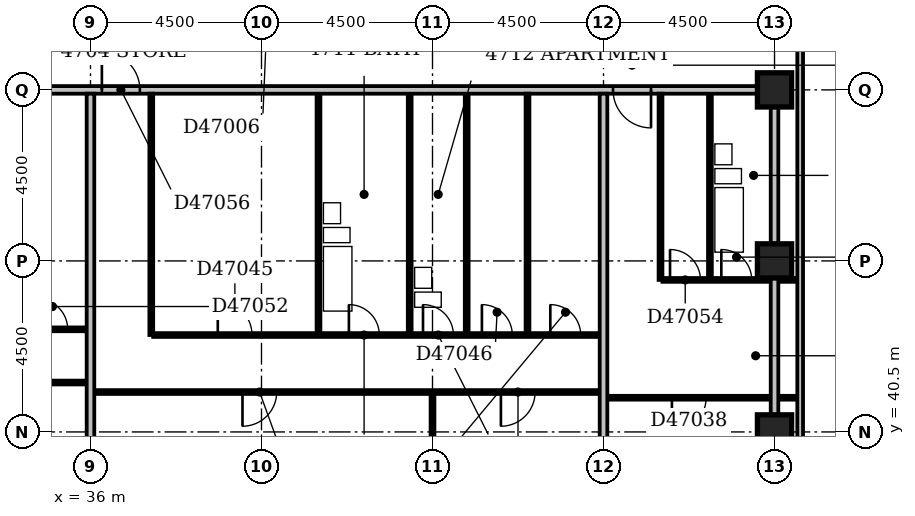
"""IFC4 building model, lengths in metres.
Left out: names, types, materials, properties, quantities, classifications, styles, units other than length and angle.
Written with IfcOpenShell. Run it as: python <this file> out.ifc"""

import sys

from ifc_helpers import new_model, si_unit, direction, frame, frame_2d, origin, origin_2d, place, context, subcontext, project, spatial, rectangle, extrude, element, fill, save


model = new_model("IFC4")
c1 = context("Model", 3, precision=1e-05, world=origin(), true_north=direction((0.0, 1.0)))
c2 = subcontext(c1, "Body", "Model", "MODEL_VIEW")
j1 = project(units=[si_unit("LENGTHUNIT", "METRE"), si_unit("PLANEANGLEUNIT", "RADIAN")], contexts=[c1])
p1 = place(None, origin())
s1 = spatial("IfcSite", under=j1, at=p1, CompositionType="ELEMENT")
p2 = place(p1, origin())
s2 = spatial("IfcBuilding", under=s1, at=p2, CompositionType="ELEMENT")
p3 = place(p2, frame((0.0, 0.0, 186.2)))
s3 = spatial("IfcBuildingStorey", under=s2, at=p3, CompositionType="ELEMENT", Elevation=186.2)
for number, where, z_axis, x_axis in (
    (1, (54.0, 40.5, -0.35), (0.0, 0.0, 1.0), (1.0, 0.0, 0.0)),
    (2, (54.0, 45.0, -0.35), (0.0, 0.0, 1.0), (1.0, 0.0, 0.0)),
    (3, (54.0, 49.5, -0.35), (0.0, 0.0, 1.0), (1.0, 0.0, 0.0)),
):
    element("IfcColumn", number, at=place(p3, frame(where, z_axis=z_axis, x_axis=x_axis)), inside=s3, PredefinedType="COLUMN", context=c2, shape_type="SweptSolid", body=[
        extrude(rectangle(XDim=0.9, YDim=0.9, at=origin_2d()), origin(), (0.0, 0.0, 1.0), 3.65),
    ])
p4 = place(p3, frame((54.675, 39.9, 0.0), z_axis=(0.0, 0.0, 1.0), x_axis=(0.0, 1.0, 0.0)))
e4 = element("IfcWall", 4, at=p4, inside=s3, PredefinedType="STANDARD", context=c2, shape_type="SweptSolid", body=[
    extrude(rectangle(XDim=14.85, YDim=0.15, at=frame_2d((7.425, 0.0))), origin(), (0.0, 0.0, 1.0), 2.7),
])
p5 = place(p4, frame((11.25, 0.0, 0.0)))
e5 = element("IfcOpeningElement", 5, at=p5, cuts=e4, PredefinedType="OPENING", context=c2, shape_type="SweptSolid", body=[
    extrude(rectangle(XDim=1.2, YDim=2.4, at=frame_2d((0.6, 1.2))), frame((0.0, 0.087, 0.0), z_axis=(0.0, -1.0, 0.0), x_axis=(1.0, 0.0, 0.0)), (0.0, 0.0, 1.0), 0.174),
])
p6 = place(p3, frame((36.0, 36.45, 0.0), z_axis=(0.0, 0.0, 1.0), x_axis=(0.0, 1.0, 0.0)))
e6 = element("IfcWall", 6, at=p6, inside=s3, PredefinedType="PARTITIONING", context=c2, shape_type="SweptSolid", body=[
    extrude(rectangle(XDim=12.95, YDim=0.2, at=frame_2d((6.475, 0.0))), origin(), (0.0, 0.0, 1.0), 2.4),
])
p7 = place(p3, frame((45.0, 36.45, 0.0), z_axis=(0.0, 0.0, 1.0), x_axis=(0.0, 1.0, 0.0)))
e7 = element("IfcWall", 7, at=p7, inside=s3, PredefinedType="PARTITIONING", context=c2, shape_type="SweptSolid", body=[
    extrude(rectangle(XDim=5.05, YDim=0.1, at=frame_2d((2.525, 0.0))), origin(), (0.0, 0.0, 1.0), 2.6),
])
p8 = place(p3, frame((49.5, 36.45, 0.0), z_axis=(0.0, 0.0, 1.0), x_axis=(0.0, 1.0, 0.0)))
e8 = element("IfcWall", 8, at=p8, inside=s3, PredefinedType="PARTITIONING", context=c2, shape_type="SweptSolid", body=[
    extrude(rectangle(XDim=12.95, YDim=0.2, at=frame_2d((6.475, 0.0))), origin(), (0.0, 0.0, 1.0), 3.3),
])
p9 = place(p3, frame((54.0, 40.95, 0.0), z_axis=(0.0, 0.0, 1.0), x_axis=(0.0, 1.0, 0.0)))
e9 = element("IfcWall", 9, at=p9, inside=s3, PredefinedType="PARTITIONING", context=c2, shape_type="SweptSolid", body=[
    extrude(rectangle(XDim=8.1, YDim=0.2, at=frame_2d((4.05, 0.0))), origin(), (0.0, 0.0, 1.0), 2.7),
])
p10 = place(p3, frame((49.6, 41.4, 0.0), z_axis=(0.0, 0.0, 1.0), x_axis=(1.0, 0.0, 0.0)))
e10 = element("IfcWall", 10, at=p10, inside=s3, PredefinedType="PARTITIONING", context=c2, shape_type="SweptSolid", body=[
    extrude(rectangle(XDim=5.0, YDim=0.1, at=frame_2d((2.5, 0.0))), origin(), (0.0, 0.0, 1.0), 3.3),
])
p11 = place(p10, frame((1.7, 0.0, 0.0)))
e11 = element("IfcOpeningElement", 11, at=p11, cuts=e10, PredefinedType="OPENING", context=c2, shape_type="SweptSolid", body=[
    extrude(rectangle(XDim=0.9, YDim=2.1, at=frame_2d((0.45, 1.05))), frame((0.0, 0.062, 0.0), z_axis=(0.0, -1.0, 0.0), x_axis=(1.0, 0.0, 0.0)), (0.0, 0.0, 1.0), 0.124),
])
p12 = place(p3, frame((36.1, 41.55, 0.0), z_axis=(0.0, 0.0, 1.0), x_axis=(1.0, 0.0, 0.0)))
e12 = element("IfcWall", 12, at=p12, inside=s3, PredefinedType="PARTITIONING", context=c2, shape_type="SweptSolid", body=[
    extrude(rectangle(XDim=13.3, YDim=0.1, at=frame_2d((6.65, 0.0))), origin(), (0.0, 0.0, 1.0), 3.3),
])
p13 = place(p12, frame((3.9, 0.0, 0.0)))
e13 = element("IfcOpeningElement", 13, at=p13, cuts=e12, PredefinedType="OPENING", context=c2, shape_type="SweptSolid", body=[
    extrude(rectangle(XDim=0.9, YDim=2.1, at=frame_2d((0.45, 1.05))), frame((0.0, 0.062, 0.0), z_axis=(0.0, -1.0, 0.0), x_axis=(1.0, 0.0, 0.0)), (0.0, 0.0, 1.0), 0.124),
])
p14 = place(p12, frame((10.7, 0.0, 0.0)))
e14 = element("IfcOpeningElement", 14, at=p14, cuts=e12, PredefinedType="OPENING", context=c2, shape_type="SweptSolid", body=[
    extrude(rectangle(XDim=0.9, YDim=2.1, at=frame_2d((0.45, 1.05))), frame((0.0, 0.062, 0.0), z_axis=(0.0, -1.0, 0.0), x_axis=(1.0, 0.0, 0.0)), (0.0, 0.0, 1.0), 0.124),
])
p15 = place(p3, frame((22.6, 41.8, 0.0), z_axis=(0.0, 0.0, 1.0), x_axis=(1.0, 0.0, 0.0)))
e15 = element("IfcWall", 15, at=p15, inside=s3, PredefinedType="PARTITIONING", context=c2, shape_type="SweptSolid", body=[
    extrude(rectangle(XDim=13.3, YDim=0.1, at=frame_2d((6.65, 0.0))), origin(), (0.0, 0.0, 1.0), 3.3),
])
p16 = place(p15, frame((1.7, 0.0, 0.0)))
e16 = element("IfcOpeningElement", 16, at=p16, cuts=e15, PredefinedType="OPENING", context=c2, shape_type="SweptSolid", body=[
    extrude(rectangle(XDim=0.9, YDim=2.1, at=frame_2d((0.45, 1.05))), frame((0.0, 0.062, 0.0), z_axis=(0.0, -1.0, 0.0), x_axis=(1.0, 0.0, 0.0)), (0.0, 0.0, 1.0), 0.124),
])
p17 = place(p15, frame((6.2, 0.0, 0.0)))
e17 = element("IfcOpeningElement", 17, at=p17, cuts=e15, PredefinedType="OPENING", context=c2, shape_type="SweptSolid", body=[
    extrude(rectangle(XDim=0.9, YDim=2.1, at=frame_2d((0.45, 1.05))), frame((0.0, 0.062, 0.0), z_axis=(0.0, -1.0, 0.0), x_axis=(1.0, 0.0, 0.0)), (0.0, 0.0, 1.0), 0.124),
])
p18 = place(p15, frame((10.7, 0.0, 0.0)))
e18 = element("IfcOpeningElement", 18, at=p18, cuts=e15, PredefinedType="OPENING", context=c2, shape_type="SweptSolid", body=[
    extrude(rectangle(XDim=0.9, YDim=2.1, at=frame_2d((0.45, 1.05))), frame((0.0, 0.062, 0.0), z_axis=(0.0, -1.0, 0.0), x_axis=(1.0, 0.0, 0.0)), (0.0, 0.0, 1.0), 0.124),
])
p19 = place(p3, frame((37.6, 43.05, 0.0), z_axis=(0.0, 0.0, 1.0), x_axis=(0.0, 1.0, 0.0)))
e19 = element("IfcWall", 19, at=p19, inside=s3, PredefinedType="PARTITIONING", context=c2, shape_type="SweptSolid", body=[
    extrude(rectangle(XDim=6.35, YDim=0.1, at=frame_2d((3.175, 0.0))), origin(), (0.0, 0.0, 1.0), 3.3),
])
p20 = place(p3, frame((37.65, 43.05, 0.0), z_axis=(0.0, 0.0, 1.0), x_axis=(1.0, 0.0, 0.0)))
e20 = element("IfcWall", 20, at=p20, inside=s3, PredefinedType="PARTITIONING", context=c2, shape_type="SweptSolid", body=[
    extrude(rectangle(XDim=11.75, YDim=0.1, at=frame_2d((5.875, 0.0))), origin(), (0.0, 0.0, 1.0), 3.3),
])
p21 = place(p20, frame((5.15, 0.0, 0.0)))
e21 = element("IfcOpeningElement", 21, at=p21, cuts=e20, PredefinedType="OPENING", context=c2, shape_type="SweptSolid", body=[
    extrude(rectangle(XDim=0.8, YDim=2.1, at=frame_2d((0.4, 1.05))), frame((0.0, 0.062, 0.0), z_axis=(0.0, -1.0, 0.0), x_axis=(1.0, 0.0, 0.0)), (0.0, 0.0, 1.0), 0.124),
])
p22 = place(p20, frame((1.7, 0.0, 0.0)))
e22 = element("IfcOpeningElement", 22, at=p22, cuts=e20, PredefinedType="OPENING", context=c2, shape_type="SweptSolid", body=[
    extrude(rectangle(XDim=0.9, YDim=2.1, at=frame_2d((0.45, 1.05))), frame((0.0, 0.062, 0.0), z_axis=(0.0, -1.0, 0.0), x_axis=(1.0, 0.0, 0.0)), (0.0, 0.0, 1.0), 0.124),
])
p23 = place(p20, frame((8.65, 0.0, 0.0)))
e23 = element("IfcOpeningElement", 23, at=p23, cuts=e20, PredefinedType="OPENING", context=c2, shape_type="SweptSolid", body=[
    extrude(rectangle(XDim=0.8, YDim=2.1, at=frame_2d((0.4, 1.05))), frame((0.0, 0.062, 0.0), z_axis=(0.0, -1.0, 0.0), x_axis=(1.0, 0.0, 0.0)), (0.0, 0.0, 1.0), 0.124),
])
p24 = place(p20, frame((10.45, 0.0, 0.0)))
e24 = element("IfcOpeningElement", 24, at=p24, cuts=e20, PredefinedType="OPENING", context=c2, shape_type="SweptSolid", body=[
    extrude(rectangle(XDim=0.8, YDim=2.1, at=frame_2d((0.4, 1.05))), frame((0.0, 0.062, 0.0), z_axis=(0.0, -1.0, 0.0), x_axis=(1.0, 0.0, 0.0)), (0.0, 0.0, 1.0), 0.124),
])
p25 = place(p20, frame((7.1, 0.0, 0.0)))
e25 = element("IfcOpeningElement", 25, at=p25, cuts=e20, PredefinedType="OPENING", context=c2, shape_type="SweptSolid", body=[
    extrude(rectangle(XDim=0.8, YDim=2.1, at=frame_2d((0.4, 1.05))), frame((0.0, 0.062, 0.0), z_axis=(0.0, -1.0, 0.0), x_axis=(1.0, 0.0, 0.0)), (0.0, 0.0, 1.0), 0.124),
])
p26 = place(p3, frame((42.0, 43.1, 0.0), z_axis=(0.0, 0.0, 1.0), x_axis=(0.0, 1.0, 0.0)))
e26 = element("IfcWall", 26, at=p26, inside=s3, PredefinedType="PLUMBINGWALL", context=c2, shape_type="SweptSolid", body=[
    extrude(rectangle(XDim=6.3, YDim=0.1, at=frame_2d((3.15, 0.0))), origin(), (0.0, 0.0, 1.0), 3.3),
])
p27 = place(p3, frame((44.4, 43.1, 0.0), z_axis=(0.0, 0.0, 1.0), x_axis=(0.0, 1.0, 0.0)))
e27 = element("IfcWall", 27, at=p27, inside=s3, PredefinedType="PLUMBINGWALL", context=c2, shape_type="SweptSolid", body=[
    extrude(rectangle(XDim=6.3, YDim=0.1, at=frame_2d((3.15, 0.0))), origin(), (0.0, 0.0, 1.0), 2.6),
])
p28 = place(p3, frame((45.9, 43.1, 0.0), z_axis=(0.0, 0.0, 1.0), x_axis=(0.0, 1.0, 0.0)))
e28 = element("IfcWall", 28, at=p28, inside=s3, PredefinedType="PLUMBINGWALL", context=c2, shape_type="SweptSolid", body=[
    extrude(rectangle(XDim=6.3, YDim=0.1, at=frame_2d((3.15, 0.0))), origin(), (0.0, 0.0, 1.0), 3.3),
])
p29 = place(p3, frame((47.5, 43.1, 0.0), z_axis=(0.0, 0.0, 1.0), x_axis=(0.0, 1.0, 0.0)))
e29 = element("IfcWall", 29, at=p29, inside=s3, PredefinedType="PARTITIONING", context=c2, shape_type="SweptSolid", body=[
    extrude(rectangle(XDim=6.3, YDim=0.1, at=frame_2d((3.15, 0.0))), origin(), (0.0, 0.0, 1.0), 3.3),
])
p30 = place(p3, frame((30.05, 43.2, 0.0), z_axis=(0.0, 0.0, 1.0), x_axis=(1.0, 0.0, 0.0)))
e30 = element("IfcWall", 30, at=p30, inside=s3, PredefinedType="PARTITIONING", context=c2, shape_type="SweptSolid", body=[
    extrude(rectangle(XDim=5.85, YDim=0.1, at=frame_2d((2.925, 0.0))), origin(), (0.0, 0.0, 1.0), 3.3),
])
p31 = place(p30, frame((0.75, 0.0, 0.0)))
e31 = element("IfcOpeningElement", 31, at=p31, cuts=e30, PredefinedType="OPENING", context=c2, shape_type="SweptSolid", body=[
    extrude(rectangle(XDim=0.8, YDim=2.1, at=frame_2d((0.4, 1.05))), frame((0.0, 0.062, 0.0), z_axis=(0.0, -1.0, 0.0), x_axis=(1.0, 0.0, 0.0)), (0.0, 0.0, 1.0), 0.124),
])
p32 = place(p30, frame((2.75, 0.0, 0.0)))
e32 = element("IfcOpeningElement", 32, at=p32, cuts=e30, PredefinedType="OPENING", context=c2, shape_type="SweptSolid", body=[
    extrude(rectangle(XDim=0.8, YDim=2.1, at=frame_2d((0.4, 1.05))), frame((0.0, 0.062, 0.0), z_axis=(0.0, -1.0, 0.0), x_axis=(1.0, 0.0, 0.0)), (0.0, 0.0, 1.0), 0.124),
])
p33 = place(p30, frame((4.55, 0.0, 0.0)))
e33 = element("IfcOpeningElement", 33, at=p33, cuts=e30, PredefinedType="OPENING", context=c2, shape_type="SweptSolid", body=[
    extrude(rectangle(XDim=0.8, YDim=2.1, at=frame_2d((0.4, 1.05))), frame((0.0, 0.062, 0.0), z_axis=(0.0, -1.0, 0.0), x_axis=(1.0, 0.0, 0.0)), (0.0, 0.0, 1.0), 0.124),
])
p34 = place(p3, frame((51.0, 44.5, 0.0), z_axis=(0.0, 0.0, 1.0), x_axis=(0.0, 1.0, 0.0)))
e34 = element("IfcWall", 34, at=p34, inside=s3, PredefinedType="PARTITIONING", context=c2, shape_type="SweptSolid", body=[
    extrude(rectangle(XDim=4.9, YDim=0.1, at=frame_2d((2.45, 0.0))), origin(), (0.0, 0.0, 1.0), 3.3),
])
p35 = place(p3, frame((51.05, 44.5, 0.0), z_axis=(0.0, 0.0, 1.0), x_axis=(1.0, 0.0, 0.0)))
e35 = element("IfcWall", 35, at=p35, inside=s3, PredefinedType="PARTITIONING", context=c2, shape_type="SweptSolid", body=[
    extrude(rectangle(XDim=3.55, YDim=0.1, at=frame_2d((1.775, 0.0))), origin(), (0.0, 0.0, 1.0), 3.3),
])
p36 = place(p35, frame((1.55, 0.0, 0.0)))
e36 = element("IfcOpeningElement", 36, at=p36, cuts=e35, PredefinedType="OPENING", context=c2, shape_type="SweptSolid", body=[
    extrude(rectangle(XDim=0.8, YDim=2.1, at=frame_2d((0.4, 1.05))), frame((0.0, 0.062, 0.0), z_axis=(0.0, -1.0, 0.0), x_axis=(1.0, 0.0, 0.0)), (0.0, 0.0, 1.0), 0.124),
])
p37 = place(p35, frame((0.2, 0.0, 0.0)))
e37 = element("IfcOpeningElement", 37, at=p37, cuts=e35, PredefinedType="OPENING", context=c2, shape_type="SweptSolid", body=[
    extrude(rectangle(XDim=0.8, YDim=2.1, at=frame_2d((0.4, 1.05))), frame((0.0, 0.062, 0.0), z_axis=(0.0, -1.0, 0.0), x_axis=(1.0, 0.0, 0.0)), (0.0, 0.0, 1.0), 0.124),
])
p38 = place(p3, frame((52.3, 44.55, 0.0), z_axis=(0.0, 0.0, 1.0), x_axis=(0.0, 1.0, 0.0)))
e38 = element("IfcWall", 38, at=p38, inside=s3, PredefinedType="PLUMBINGWALL", context=c2, shape_type="SweptSolid", body=[
    extrude(rectangle(XDim=4.85, YDim=0.1, at=frame_2d((2.425, 0.0))), origin(), (0.0, 0.0, 1.0), 3.3),
])
p39 = place(p3, frame((22.6, 49.5, 0.0), z_axis=(0.0, 0.0, 1.0), x_axis=(1.0, 0.0, 0.0)))
e39 = element("IfcWall", 39, at=p39, inside=s3, PredefinedType="PARTITIONING", context=c2, shape_type="SweptSolid", body=[
    extrude(rectangle(XDim=30.95, YDim=0.2, at=frame_2d((15.475, 0.0))), origin(), (0.0, 0.0, 1.0), 3.3),
])
p40 = place(p39, frame((6.1, 0.0, 0.0)))
e40 = element("IfcOpeningElement", 40, at=p40, cuts=e39, PredefinedType="OPENING", context=c2, shape_type="SweptSolid", body=[
    extrude(rectangle(XDim=1.0, YDim=2.1, at=frame_2d((0.5, 1.05))), frame((0.0, 0.112, 0.0), z_axis=(0.0, -1.0, 0.0), x_axis=(1.0, 0.0, 0.0)), (0.0, 0.0, 1.0), 0.224),
])
p41 = place(p39, frame((13.7, 0.0, 0.0)))
e41 = element("IfcOpeningElement", 41, at=p41, cuts=e39, PredefinedType="OPENING", context=c2, shape_type="SweptSolid", body=[
    extrude(rectangle(XDim=1.0, YDim=2.1, at=frame_2d((0.5, 1.05))), frame((0.0, 0.112, 0.0), z_axis=(0.0, -1.0, 0.0), x_axis=(1.0, 0.0, 0.0)), (0.0, 0.0, 1.0), 0.224),
])
p42 = place(p39, frame((27.15, 0.0, 0.0)))
e42 = element("IfcOpeningElement", 42, at=p42, cuts=e39, PredefinedType="OPENING", context=c2, shape_type="SweptSolid", body=[
    extrude(rectangle(XDim=1.0, YDim=2.1, at=frame_2d((0.5, 1.05))), frame((0.0, 0.112, 0.0), z_axis=(0.0, -1.0, 0.0), x_axis=(1.0, 0.0, 0.0)), (0.0, 0.0, 1.0), 0.224),
])
p43 = place(p11, frame((0.9, 0.0, 0.0), z_axis=(0.0, 0.0, 1.0), x_axis=(-1.0, 0.0, 0.0)))
e43 = element("IfcDoor", 43, at=p43, inside=s3, OperationType="SINGLE_SWING_RIGHT", PredefinedType="DOOR", context=c2, shape_type="SweptSolid", body=[
    extrude(rectangle(XDim=0.9, YDim=2.1, at=frame_2d((0.45, 1.05))), frame((0.0, 0.025, 0.0), z_axis=(0.0, -1.0, 0.0), x_axis=(1.0, 0.0, 0.0)), (0.0, 0.0, 1.0), 0.05),
])
fill(e11, e43)
p44 = place(p13, frame((0.9, 0.0, 0.0), z_axis=(0.0, 0.0, 1.0), x_axis=(-1.0, 0.0, 0.0)))
e44 = element("IfcDoor", 44, at=p44, inside=s3, OperationType="SINGLE_SWING_RIGHT", PredefinedType="DOOR", context=c2, shape_type="SweptSolid", body=[
    extrude(rectangle(XDim=0.9, YDim=2.1, at=frame_2d((0.45, 1.05))), frame((0.0, 0.025, 0.0), z_axis=(0.0, -1.0, 0.0), x_axis=(1.0, 0.0, 0.0)), (0.0, 0.0, 1.0), 0.05),
])
fill(e13, e44)
p45 = place(p14, frame((0.9, 0.0, 0.0), z_axis=(0.0, 0.0, 1.0), x_axis=(-1.0, 0.0, 0.0)))
e45 = element("IfcDoor", 45, at=p45, inside=s3, OperationType="SINGLE_SWING_RIGHT", PredefinedType="DOOR", context=c2, shape_type="SweptSolid", body=[
    extrude(rectangle(XDim=0.9, YDim=2.1, at=frame_2d((0.45, 1.05))), frame((0.0, 0.025, 0.0), z_axis=(0.0, -1.0, 0.0), x_axis=(1.0, 0.0, 0.0)), (0.0, 0.0, 1.0), 0.05),
])
fill(e14, e45)
p46 = place(p21, origin())
e46 = element("IfcDoor", 46, at=p46, inside=s3, OperationType="SINGLE_SWING_LEFT", PredefinedType="DOOR", context=c2, shape_type="SweptSolid", body=[
    extrude(rectangle(XDim=0.8, YDim=2.1, at=frame_2d((0.4, 1.05))), frame((0.0, 0.025, 0.0), z_axis=(0.0, -1.0, 0.0), x_axis=(1.0, 0.0, 0.0)), (0.0, 0.0, 1.0), 0.05),
])
fill(e21, e46)
p47 = place(p22, origin())
e47 = element("IfcDoor", 47, at=p47, inside=s3, OperationType="SINGLE_SWING_LEFT", PredefinedType="DOOR", context=c2, shape_type="SweptSolid", body=[
    extrude(rectangle(XDim=0.9, YDim=2.1, at=frame_2d((0.45, 1.05))), frame((0.0, 0.025, 0.0), z_axis=(0.0, -1.0, 0.0), x_axis=(1.0, 0.0, 0.0)), (0.0, 0.0, 1.0), 0.05),
])
fill(e22, e47)
p48 = place(p23, origin())
e48 = element("IfcDoor", 48, at=p48, inside=s3, OperationType="SINGLE_SWING_LEFT", PredefinedType="DOOR", context=c2, shape_type="SweptSolid", body=[
    extrude(rectangle(XDim=0.8, YDim=2.1, at=frame_2d((0.4, 1.05))), frame((0.0, 0.025, 0.0), z_axis=(0.0, -1.0, 0.0), x_axis=(1.0, 0.0, 0.0)), (0.0, 0.0, 1.0), 0.05),
])
fill(e23, e48)
p49 = place(p24, origin())
e49 = element("IfcDoor", 49, at=p49, inside=s3, OperationType="SINGLE_SWING_LEFT", PredefinedType="DOOR", context=c2, shape_type="SweptSolid", body=[
    extrude(rectangle(XDim=0.8, YDim=2.1, at=frame_2d((0.4, 1.05))), frame((0.0, 0.025, 0.0), z_axis=(0.0, -1.0, 0.0), x_axis=(1.0, 0.0, 0.0)), (0.0, 0.0, 1.0), 0.05),
])
fill(e24, e49)
p50 = place(p25, origin())
e50 = element("IfcDoor", 50, at=p50, inside=s3, OperationType="SINGLE_SWING_LEFT", PredefinedType="DOOR", context=c2, shape_type="SweptSolid", body=[
    extrude(rectangle(XDim=0.8, YDim=2.1, at=frame_2d((0.4, 1.05))), frame((0.0, 0.025, 0.0), z_axis=(0.0, -1.0, 0.0), x_axis=(1.0, 0.0, 0.0)), (0.0, 0.0, 1.0), 0.05),
])
fill(e25, e50)
p51 = place(p33, origin())
e51 = element("IfcDoor", 51, at=p51, inside=s3, OperationType="SINGLE_SWING_LEFT", PredefinedType="DOOR", context=c2, shape_type="SweptSolid", body=[
    extrude(rectangle(XDim=0.8, YDim=2.1, at=frame_2d((0.4, 1.05))), frame((0.0, 0.025, 0.0), z_axis=(0.0, -1.0, 0.0), x_axis=(1.0, 0.0, 0.0)), (0.0, 0.0, 1.0), 0.05),
])
fill(e33, e51)
p52 = place(p36, origin())
e52 = element("IfcDoor", 52, at=p52, inside=s3, OperationType="SINGLE_SWING_LEFT", PredefinedType="DOOR", context=c2, shape_type="SweptSolid", body=[
    extrude(rectangle(XDim=0.8, YDim=2.1, at=frame_2d((0.4, 1.05))), frame((0.0, 0.025, 0.0), z_axis=(0.0, -1.0, 0.0), x_axis=(1.0, 0.0, 0.0)), (0.0, 0.0, 1.0), 0.05),
])
fill(e36, e52)
p53 = place(p37, origin())
e53 = element("IfcDoor", 53, at=p53, inside=s3, OperationType="SINGLE_SWING_LEFT", PredefinedType="DOOR", context=c2, shape_type="SweptSolid", body=[
    extrude(rectangle(XDim=0.8, YDim=2.1, at=frame_2d((0.4, 1.05))), frame((0.0, 0.025, 0.0), z_axis=(0.0, -1.0, 0.0), x_axis=(1.0, 0.0, 0.0)), (0.0, 0.0, 1.0), 0.05),
])
fill(e37, e53)
p54 = place(p41, origin())
e54 = element("IfcDoor", 54, at=p54, inside=s3, OperationType="SINGLE_SWING_LEFT", PredefinedType="DOOR", context=c2, shape_type="SweptSolid", body=[
    extrude(rectangle(XDim=1.0, YDim=2.1, at=frame_2d((0.5, 1.05))), frame((0.0, 0.025, 0.0), z_axis=(0.0, -1.0, 0.0), x_axis=(1.0, 0.0, 0.0)), (0.0, 0.0, 1.0), 0.05),
])
fill(e41, e54)
p55 = place(p42, origin())
e55 = element("IfcDoor", 55, at=p55, inside=s3, OperationType="SINGLE_SWING_RIGHT", PredefinedType="DOOR", context=c2, shape_type="SweptSolid", body=[
    extrude(rectangle(XDim=1.0, YDim=2.1, at=frame_2d((0.5, 1.05))), frame((0.0, 0.025, 0.0), z_axis=(0.0, -1.0, 0.0), x_axis=(1.0, 0.0, 0.0)), (0.0, 0.0, 1.0), 0.05),
])
fill(e42, e55)
save(model, sys.argv[1])
